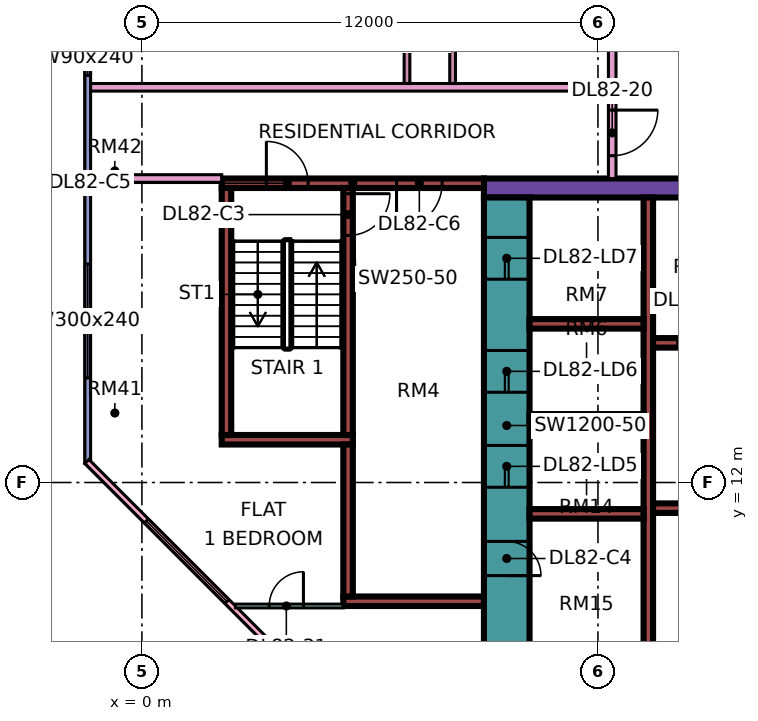
"""IFC4 building model, lengths in metres.
Left out: names, types, materials, properties, quantities, classifications, styles, units other than length and angle.
Written with IfcOpenShell. Run it as: python <this file> out.ifc"""

import sys

from ifc_helpers import new_model, si_unit, direction, frame, frame_2d, origin, place, context, subcontext, project, spatial, rectangle, extrude, element, fill, save


model = new_model("IFC4")
c1 = context("Model", 3, precision=1e-05, world=origin(), true_north=direction((0.0, 1.0)))
c2 = subcontext(c1, "Body", "Model", "MODEL_VIEW")
j1 = project(units=[si_unit("LENGTHUNIT", "METRE"), si_unit("PLANEANGLEUNIT", "RADIAN")], contexts=[c1])
p1 = place(None, origin())
s1 = spatial("IfcSite", under=j1, at=p1, CompositionType="ELEMENT")
p2 = place(p1, origin())
s2 = spatial("IfcBuilding", under=s1, at=p2, CompositionType="ELEMENT")
p3 = place(p2, frame((0.0, 0.0, 353.9)))
s3 = spatial("IfcBuildingStorey", under=s2, at=p3, CompositionType="ELEMENT", Elevation=353.9)
p4 = place(p3, frame((9.0, 19.75, 0.0), z_axis=(0.0, 0.0, 1.0), x_axis=(1.0, 0.0, 0.0)))
e1 = element("IfcWall", 1, at=p4, inside=s3, PredefinedType="SHEAR", context=c2, shape_type="SweptSolid", body=[
    extrude(rectangle(XDim=25.0, YDim=0.5, at=frame_2d((12.5, 0.0))), origin(), (0.0, 0.0, 1.0), 3.75),
])
p5 = place(p4, frame((19.1, 0.0, 0.0)))
e2 = element("IfcOpeningElement", 2, at=p5, cuts=e1, PredefinedType="OPENING", context=c2, shape_type="SweptSolid", body=[
    extrude(rectangle(XDim=1.8, YDim=2.4, at=frame_2d((0.9, 1.2))), frame((0.0, 0.26, 0.0), z_axis=(0.0, -1.0, 0.0), x_axis=(1.0, 0.0, 0.0)), (0.0, 0.0, 1.0), 0.52),
])
p6 = place(p3, frame((9.6, 7.5, 0.0), z_axis=(0.0, 0.0, 1.0), x_axis=(0.0, 1.0, 0.0)))
e3 = element("IfcWall", 3, at=p6, inside=s3, PredefinedType="SHEAR", context=c2, shape_type="SweptSolid", body=[
    extrude(rectangle(XDim=12.0, YDim=1.2, at=frame_2d((6.0, 0.0))), origin(), (0.0, 0.0, 1.0), 3.75),
])
p7 = place(p6, frame((4.375, 0.0, 0.0)))
e4 = element("IfcOpeningElement", 4, at=p7, cuts=e3, PredefinedType="OPENING", context=c2, shape_type="SweptSolid", body=[
    extrude(rectangle(XDim=1.1, YDim=2.2, at=frame_2d((0.55, 1.1))), frame((0.0, 0.61, 0.0), z_axis=(0.0, -1.0, 0.0), x_axis=(1.0, 0.0, 0.0)), (0.0, 0.0, 1.0), 1.22),
])
p8 = place(p6, frame((6.875, 0.0, 0.0)))
e5 = element("IfcOpeningElement", 5, at=p8, cuts=e3, PredefinedType="OPENING", context=c2, shape_type="SweptSolid", body=[
    extrude(rectangle(XDim=1.1, YDim=2.2, at=frame_2d((0.55, 1.1))), frame((0.0, 0.61, 0.0), z_axis=(0.0, -1.0, 0.0), x_axis=(1.0, 0.0, 0.0)), (0.0, 0.0, 1.0), 1.22),
])
p9 = place(p6, frame((9.85, 0.0, 0.0)))
e6 = element("IfcOpeningElement", 6, at=p9, cuts=e3, PredefinedType="OPENING", context=c2, shape_type="SweptSolid", body=[
    extrude(rectangle(XDim=1.1, YDim=2.2, at=frame_2d((0.55, 1.1))), frame((0.0, 0.61, 0.0), z_axis=(0.0, -1.0, 0.0), x_axis=(1.0, 0.0, 0.0)), (0.0, 0.0, 1.0), 1.22),
])
p10 = place(p6, frame((2.05, 0.0, 0.0)))
e7 = element("IfcOpeningElement", 7, at=p10, cuts=e3, PredefinedType="OPENING", context=c2, shape_type="SweptSolid", body=[
    extrude(rectangle(XDim=0.9, YDim=2.1, at=frame_2d((0.45, 1.05))), frame((0.0, 0.61, 0.0), z_axis=(0.0, -1.0, 0.0), x_axis=(1.0, 0.0, 0.0)), (0.0, 0.0, 1.0), 1.22),
])
p11 = place(p3, frame((13.325, 7.5, 0.0), z_axis=(0.0, 0.0, 1.0), x_axis=(0.0, 1.0, 0.0)))
e8 = element("IfcWall", 8, at=p11, inside=s3, PredefinedType="SHEAR", context=c2, shape_type="SweptSolid", body=[
    extrude(rectangle(XDim=12.0, YDim=0.25, at=frame_2d((6.0, 0.0))), origin(), (0.0, 0.0, 1.0), 3.75),
])
p12 = place(p3, frame((13.45, 11.325, 0.0), z_axis=(0.0, 0.0, 1.0), x_axis=(1.0, 0.0, 0.0)))
e9 = element("IfcWall", 9, at=p12, inside=s3, PredefinedType="SHEAR", context=c2, shape_type="SweptSolid", body=[
    extrude(rectangle(XDim=20.05, YDim=0.25, at=frame_2d((10.025, 0.0))), origin(), (0.0, 0.0, 1.0), 3.75),
])
p13 = place(p12, frame((1.55, 0.0, 0.0)))
e10 = element("IfcOpeningElement", 10, at=p13, cuts=e9, PredefinedType="OPENING", context=c2, shape_type="SweptSolid", body=[
    extrude(rectangle(XDim=0.9, YDim=2.1, at=frame_2d((0.45, 1.05))), frame((0.0, 0.135, 0.0), z_axis=(0.0, -1.0, 0.0), x_axis=(1.0, 0.0, 0.0)), (0.0, 0.0, 1.0), 0.27),
])
p14 = place(p12, frame((6.925, 0.0, 0.0)))
e11 = element("IfcOpeningElement", 11, at=p14, cuts=e9, PredefinedType="OPENING", context=c2, shape_type="SweptSolid", body=[
    extrude(rectangle(XDim=0.9, YDim=2.1, at=frame_2d((0.45, 1.05))), frame((0.0, 0.135, 0.0), z_axis=(0.0, -1.0, 0.0), x_axis=(1.0, 0.0, 0.0)), (0.0, 0.0, 1.0), 0.27),
])
p15 = place(p12, frame((15.075, 0.0, 0.0)))
e12 = element("IfcOpeningElement", 12, at=p15, cuts=e9, PredefinedType="OPENING", context=c2, shape_type="SweptSolid", body=[
    extrude(rectangle(XDim=0.9, YDim=2.1, at=frame_2d((0.45, 1.05))), frame((0.0, 0.135, 0.0), z_axis=(0.0, -1.0, 0.0), x_axis=(1.0, 0.0, 0.0)), (0.0, 0.0, 1.0), 0.27),
])
p16 = place(p3, frame((13.45, 15.675, 0.0), z_axis=(0.0, 0.0, 1.0), x_axis=(1.0, 0.0, 0.0)))
e13 = element("IfcWall", 13, at=p16, inside=s3, PredefinedType="SHEAR", context=c2, shape_type="SweptSolid", body=[
    extrude(rectangle(XDim=13.75, YDim=0.25, at=frame_2d((6.875, 0.0))), origin(), (0.0, 0.0, 1.0), 3.75),
])
p17 = place(p16, frame((0.65, 0.0, 0.0)))
e14 = element("IfcOpeningElement", 14, at=p17, cuts=e13, PredefinedType="OPENING", context=c2, shape_type="SweptSolid", body=[
    extrude(rectangle(XDim=1.2, YDim=2.2, at=frame_2d((0.6, 1.1))), frame((0.0, 0.135, 0.0), z_axis=(0.0, -1.0, 0.0), x_axis=(1.0, 0.0, 0.0)), (0.0, 0.0, 1.0), 0.27),
])
p18 = place(p16, frame((3.4, 0.0, 0.0)))
e15 = element("IfcOpeningElement", 15, at=p18, cuts=e13, PredefinedType="OPENING", context=c2, shape_type="SweptSolid", body=[
    extrude(rectangle(XDim=1.2, YDim=2.2, at=frame_2d((0.6, 1.1))), frame((0.0, 0.135, 0.0), z_axis=(0.0, -1.0, 0.0), x_axis=(1.0, 0.0, 0.0)), (0.0, 0.0, 1.0), 0.27),
])
p19 = place(p16, frame((6.15, 0.0, 0.0)))
e16 = element("IfcOpeningElement", 16, at=p19, cuts=e13, PredefinedType="OPENING", context=c2, shape_type="SweptSolid", body=[
    extrude(rectangle(XDim=1.2, YDim=2.2, at=frame_2d((0.6, 1.1))), frame((0.0, 0.135, 0.0), z_axis=(0.0, -1.0, 0.0), x_axis=(1.0, 0.0, 0.0)), (0.0, 0.0, 1.0), 0.27),
])
p20 = place(p16, frame((8.9, 0.0, 0.0)))
e17 = element("IfcOpeningElement", 17, at=p20, cuts=e13, PredefinedType="OPENING", context=c2, shape_type="SweptSolid", body=[
    extrude(rectangle(XDim=1.2, YDim=2.2, at=frame_2d((0.6, 1.1))), frame((0.0, 0.135, 0.0), z_axis=(0.0, -1.0, 0.0), x_axis=(1.0, 0.0, 0.0)), (0.0, 0.0, 1.0), 0.27),
])
p21 = place(p16, frame((11.8, 0.0, 0.0)))
e18 = element("IfcOpeningElement", 18, at=p21, cuts=e13, PredefinedType="OPENING", context=c2, shape_type="SweptSolid", body=[
    extrude(rectangle(XDim=0.9, YDim=2.1, at=frame_2d((0.45, 1.05))), frame((0.0, 0.135, 0.0), z_axis=(0.0, -1.0, 0.0), x_axis=(1.0, 0.0, 0.0)), (0.0, 0.0, 1.0), 0.27),
])
for number, where, z_axis, x_axis in (
    (19, (10.2, 11.175, 0.0), (0.0, 0.0, 1.0), (1.0, 0.0, 0.0)),
    (20, (10.2, 13.675, 0.0), (0.0, 0.0, 1.0), (1.0, 0.0, 0.0)),
    (21, (10.2, 16.175, 0.0), (0.0, 0.0, 1.0), (1.0, 0.0, 0.0)),
):
    element("IfcWall", number, at=place(p3, frame(where, z_axis=z_axis, x_axis=x_axis)), inside=s3, PredefinedType="SHEAR", context=c2, shape_type="SweptSolid", body=[
        extrude(rectangle(XDim=3.0, YDim=0.25, at=frame_2d((1.5, 0.0))), origin(), (0.0, 0.0, 1.0), 3.75),
    ])
p22 = place(p3, frame((2.1, 19.875, 0.0), z_axis=(0.0, 0.0, 1.0), x_axis=(1.0, 0.0, 0.0)))
e22 = element("IfcWall", 22, at=p22, inside=s3, PredefinedType="SHEAR", context=c2, shape_type="SweptSolid", body=[
    extrude(rectangle(XDim=6.9, YDim=0.25, at=frame_2d((3.45, 0.0))), origin(), (0.0, 0.0, 1.0), 3.75),
])
p23 = place(p22, frame((1.175, 0.0, 0.0)))
e23 = element("IfcOpeningElement", 23, at=p23, cuts=e22, PredefinedType="OPENING", context=c2, shape_type="SweptSolid", body=[
    extrude(rectangle(XDim=1.1, YDim=2.2, at=frame_2d((0.55, 1.1))), frame((0.0, 0.135, 0.0), z_axis=(0.0, -1.0, 0.0), x_axis=(1.0, 0.0, 0.0)), (0.0, 0.0, 1.0), 0.27),
])
p24 = place(p22, frame((4.6, 0.0, 0.0)))
e24 = element("IfcOpeningElement", 24, at=p24, cuts=e22, PredefinedType="OPENING", context=c2, shape_type="SweptSolid", body=[
    extrude(rectangle(XDim=1.2, YDim=2.2, at=frame_2d((0.6, 1.1))), frame((0.0, 0.135, 0.0), z_axis=(0.0, -1.0, 0.0), x_axis=(1.0, 0.0, 0.0)), (0.0, 0.0, 1.0), 0.27),
])
p25 = place(p3, frame((2.1, 13.125, 0.0), z_axis=(0.0, 0.0, 1.0), x_axis=(1.0, 0.0, 0.0)))
e25 = element("IfcWall", 25, at=p25, inside=s3, PredefinedType="SHEAR", context=c2, shape_type="SweptSolid", body=[
    extrude(rectangle(XDim=3.45, YDim=0.25, at=frame_2d((1.725, 0.0))), origin(), (0.0, 0.0, 1.0), 3.75),
])
p26 = place(p3, frame((2.225, 13.25, 0.0), z_axis=(0.0, 0.0, 1.0), x_axis=(0.0, 1.0, 0.0)))
e26 = element("IfcWall", 26, at=p26, inside=s3, PredefinedType="SHEAR", context=c2, shape_type="SweptSolid", body=[
    extrude(rectangle(XDim=6.5, YDim=0.25, at=frame_2d((3.25, 0.0))), origin(), (0.0, 0.0, 1.0), 3.75),
])
p27 = place(p3, frame((5.425, 13.25, 0.0), z_axis=(0.0, 0.0, 1.0), x_axis=(0.0, 1.0, 0.0)))
e27 = element("IfcWall", 27, at=p27, inside=s3, PredefinedType="SHEAR", context=c2, shape_type="SweptSolid", body=[
    extrude(rectangle(XDim=6.5, YDim=0.25, at=frame_2d((3.25, 0.0))), origin(), (0.0, 0.0, 1.0), 3.75),
])
p28 = place(p27, frame((5.25, 0.0, 0.0)))
e28 = element("IfcOpeningElement", 28, at=p28, cuts=e27, PredefinedType="OPENING", context=c2, shape_type="SweptSolid", body=[
    extrude(rectangle(XDim=1.1, YDim=2.2, at=frame_2d((0.55, 1.1))), frame((0.0, 0.135, 0.0), z_axis=(0.0, -1.0, 0.0), x_axis=(1.0, 0.0, 0.0)), (0.0, 0.0, 1.0), 0.27),
])
p29 = place(p3, frame((5.3, 8.875, 0.0), z_axis=(0.0, 0.0, 1.0), x_axis=(1.0, 0.0, 0.0)))
e29 = element("IfcWall", 29, at=p29, inside=s3, PredefinedType="SHEAR", context=c2, shape_type="SweptSolid", body=[
    extrude(rectangle(XDim=3.7, YDim=0.25, at=frame_2d((1.85, 0.0))), origin(), (0.0, 0.0, 1.0), 3.75),
])
p30 = place(p3, frame((5.425, 9.0, 0.0), z_axis=(0.0, 0.0, 1.0), x_axis=(0.0, 1.0, 0.0)))
e30 = element("IfcWall", 30, at=p30, inside=s3, PredefinedType="SHEAR", context=c2, shape_type="SweptSolid", body=[
    extrude(rectangle(XDim=4.0, YDim=0.25, at=frame_2d((2.0, 0.0))), origin(), (0.0, 0.0, 1.0), 3.75),
])
p31 = place(p3, frame((-1.425, 23.925, 0.0), z_axis=(0.0, 0.0, 1.0), x_axis=(0.0, -1.0, 0.0)))
e31 = element("IfcWall", 31, at=p31, inside=s3, PredefinedType="SOLIDWALL", context=c2, shape_type="SweptSolid", body=[
    extrude(rectangle(XDim=11.425, YDim=0.15, at=frame_2d((5.712, 0.0))), origin(), (0.0, 0.0, 1.0), 3.35),
])
p32 = place(p31, frame((0.312, 0.0, 0.45)))
e32 = element("IfcOpeningElement", 32, at=p32, cuts=e31, PredefinedType="OPENING", context=c2, shape_type="SweptSolid", body=[
    extrude(rectangle(XDim=0.9, YDim=2.4, at=frame_2d((0.45, 1.2))), frame((0.0, 0.085, 0.0), z_axis=(0.0, -1.0, 0.0), x_axis=(1.0, 0.0, 0.0)), (0.0, 0.0, 1.0), 0.17),
])
p33 = place(p31, frame((6.175, 0.0, 0.45)))
e33 = element("IfcOpeningElement", 33, at=p33, cuts=e31, PredefinedType="OPENING", context=c2, shape_type="SweptSolid", body=[
    extrude(rectangle(XDim=3.0, YDim=2.4, at=frame_2d((1.5, 1.2))), frame((0.0, 0.085, 0.0), z_axis=(0.0, -1.0, 0.0), x_axis=(1.0, 0.0, 0.0)), (0.0, 0.0, 1.0), 0.17),
])
p34 = place(p3, frame((-1.447, 12.553, 0.0), z_axis=(0.0, 0.0, 1.0), x_axis=(0.707106781187, -0.707106781187, 0.0)))
e34 = element("IfcWall", 34, at=p34, inside=s3, PredefinedType="SOLIDWALL", context=c2, shape_type="SweptSolid", body=[
    extrude(rectangle(XDim=19.799, YDim=0.15, at=frame_2d((9.899, 0.0))), origin(), (0.0, 0.0, 1.0), 3.35),
])
p35 = place(p34, frame((2.212, 0.0, 0.45)))
e35 = element("IfcOpeningElement", 35, at=p35, cuts=e34, PredefinedType="OPENING", context=c2, shape_type="SweptSolid", body=[
    extrude(rectangle(XDim=3.0, YDim=2.4, at=frame_2d((1.5, 1.2))), frame((0.0, 0.085, 0.0), z_axis=(0.0, -1.0, 0.0), x_axis=(1.0, 0.0, 0.0)), (0.0, 0.0, 1.0), 0.17),
])
p36 = place(p34, frame((10.216, 0.0, 0.45)))
e36 = element("IfcOpeningElement", 36, at=p36, cuts=e34, PredefinedType="OPENING", context=c2, shape_type="SweptSolid", body=[
    extrude(rectangle(XDim=3.0, YDim=2.4, at=frame_2d((1.5, 1.2))), frame((0.0, 0.085, 0.0), z_axis=(0.0, -1.0, 0.0), x_axis=(1.0, 0.0, 0.0)), (0.0, 0.0, 1.0), 0.17),
])
p37 = place(p3, frame((-1.35, 20.0, 0.0), z_axis=(0.0, 0.0, 1.0), x_axis=(1.0, 0.0, 0.0)))
e37 = element("IfcWall", 37, at=p37, inside=s3, PredefinedType="PARTITIONING", context=c2, shape_type="SweptSolid", body=[
    extrude(rectangle(XDim=3.45, YDim=0.2, at=frame_2d((1.725, 0.0))), origin(), (0.0, 0.0, 1.0), 3.35),
])
p38 = place(p3, frame((-1.35, 22.4, 0.0), z_axis=(0.0, 0.0, 1.0), x_axis=(1.0, 0.0, 0.0)))
e38 = element("IfcWall", 38, at=p38, inside=s3, PredefinedType="PARTITIONING", context=c2, shape_type="SweptSolid", body=[
    extrude(rectangle(XDim=13.625, YDim=0.2, at=frame_2d((6.812, 0.0))), origin(), (0.0, 0.0, 1.0), 3.35),
])
p39 = place(p3, frame((2.461, 8.75, 0.0), z_axis=(0.0, 0.0, 1.0), x_axis=(1.0, 0.0, 0.0)))
e39 = element("IfcWall", 39, at=p39, inside=s3, PredefinedType="PARTITIONING", context=c2, shape_type="SweptSolid", body=[
    extrude(rectangle(XDim=2.839, YDim=0.1, at=frame_2d((1.419, 0.0))), origin(), (0.0, 0.0, 1.0), 3.35),
])
p40 = place(p39, frame((0.889, 0.0, 0.0)))
e40 = element("IfcOpeningElement", 40, at=p40, cuts=e39, PredefinedType="OPENING", context=c2, shape_type="SweptSolid", body=[
    extrude(rectangle(XDim=0.9, YDim=2.1, at=frame_2d((0.45, 1.05))), frame((0.0, 0.06, 0.0), z_axis=(0.0, -1.0, 0.0), x_axis=(1.0, 0.0, 0.0)), (0.0, 0.0, 1.0), 0.12),
])
p41 = place(p3, frame((6.975, 22.5, 0.0), z_axis=(0.0, 0.0, 1.0), x_axis=(0.0, 1.0, 0.0)))
e41 = element("IfcWall", 41, at=p41, inside=s3, PredefinedType="PARTITIONING", context=c2, shape_type="SweptSolid", body=[
    extrude(rectangle(XDim=10.55, YDim=0.15, at=frame_2d((5.275, 0.0))), origin(), (0.0, 0.0, 1.0), 3.35),
])
p42 = place(p41, frame((1.8, 0.0, 0.0)))
e42 = element("IfcOpeningElement", 42, at=p42, cuts=e41, PredefinedType="OPENING", context=c2, shape_type="SweptSolid", body=[
    extrude(rectangle(XDim=0.9, YDim=2.1, at=frame_2d((0.45, 1.05))), frame((0.0, 0.085, 0.0), z_axis=(0.0, -1.0, 0.0), x_axis=(1.0, 0.0, 0.0)), (0.0, 0.0, 1.0), 0.17),
])
p43 = place(p41, frame((8.55, 0.0, 0.0)))
e43 = element("IfcOpeningElement", 43, at=p43, cuts=e41, PredefinedType="OPENING", context=c2, shape_type="SweptSolid", body=[
    extrude(rectangle(XDim=0.9, YDim=2.1, at=frame_2d((0.45, 1.05))), frame((0.0, 0.085, 0.0), z_axis=(0.0, -1.0, 0.0), x_axis=(1.0, 0.0, 0.0)), (0.0, 0.0, 1.0), 0.17),
])
p44 = place(p3, frame((8.175, 22.5, 0.0), z_axis=(0.0, 0.0, 1.0), x_axis=(0.0, 1.0, 0.0)))
e44 = element("IfcWall", 44, at=p44, inside=s3, PredefinedType="PARTITIONING", context=c2, shape_type="SweptSolid", body=[
    extrude(rectangle(XDim=9.975, YDim=0.15, at=frame_2d((4.988, 0.0))), origin(), (0.0, 0.0, 1.0), 3.35),
])
p45 = place(p44, frame((8.25, 0.0, 0.0)))
e45 = element("IfcOpeningElement", 45, at=p45, cuts=e44, PredefinedType="OPENING", context=c2, shape_type="SweptSolid", body=[
    extrude(rectangle(XDim=0.8, YDim=2.1, at=frame_2d((0.4, 1.05))), frame((0.0, 0.085, 0.0), z_axis=(0.0, -1.0, 0.0), x_axis=(1.0, 0.0, 0.0)), (0.0, 0.0, 1.0), 0.17),
])
p46 = place(p44, frame((3.2, 0.0, 0.0)))
e46 = element("IfcOpeningElement", 46, at=p46, cuts=e44, PredefinedType="OPENING", context=c2, shape_type="SweptSolid", body=[
    extrude(rectangle(XDim=0.9, YDim=2.1, at=frame_2d((0.45, 1.05))), frame((0.0, 0.085, 0.0), z_axis=(0.0, -1.0, 0.0), x_axis=(1.0, 0.0, 0.0)), (0.0, 0.0, 1.0), 0.17),
])
p47 = place(p3, frame((12.375, 20.0, 0.0), z_axis=(0.0, 0.0, 1.0), x_axis=(0.0, 1.0, 0.0)))
e47 = element("IfcWall", 47, at=p47, inside=s3, PredefinedType="PARTITIONING", context=c2, shape_type="SweptSolid", body=[
    extrude(rectangle(XDim=34.0, YDim=0.2, at=frame_2d((17.0, 0.0))), origin(), (0.0, 0.0, 1.0), 3.35),
])
p48 = place(p47, frame((22.95, 0.0, 0.0)))
e48 = element("IfcOpeningElement", 48, at=p48, cuts=e47, PredefinedType="OPENING", context=c2, shape_type="SweptSolid", body=[
    extrude(rectangle(XDim=1.0, YDim=2.1, at=frame_2d((0.5, 1.05))), frame((0.0, 0.11, 0.0), z_axis=(0.0, -1.0, 0.0), x_axis=(1.0, 0.0, 0.0)), (0.0, 0.0, 1.0), 0.22),
])
p49 = place(p47, frame((0.6, 0.0, 0.0)))
e49 = element("IfcOpeningElement", 49, at=p49, cuts=e47, PredefinedType="OPENING", context=c2, shape_type="SweptSolid", body=[
    extrude(rectangle(XDim=1.2, YDim=2.1, at=frame_2d((0.6, 1.05))), frame((0.0, 0.11, 0.0), z_axis=(0.0, -1.0, 0.0), x_axis=(1.0, 0.0, 0.0)), (0.0, 0.0, 1.0), 0.22),
])
p50 = place(p47, frame((13.65, 0.0, 0.0)))
e50 = element("IfcOpeningElement", 50, at=p50, cuts=e47, PredefinedType="OPENING", context=c2, shape_type="SweptSolid", body=[
    extrude(rectangle(XDim=1.0, YDim=2.1, at=frame_2d((0.5, 1.05))), frame((0.0, 0.11, 0.0), z_axis=(0.0, -1.0, 0.0), x_axis=(1.0, 0.0, 0.0)), (0.0, 0.0, 1.0), 0.22),
])
p51 = place(p32, origin())
e51 = element("IfcWindow", 51, at=p51, inside=s3, PartitioningType="SINGLE_PANEL", PredefinedType="WINDOW", context=c2, shape_type="SweptSolid", body=[
    extrude(rectangle(XDim=0.9, YDim=2.4, at=frame_2d((0.45, 1.2))), frame((0.0, 0.03, 0.0), z_axis=(0.0, -1.0, 0.0), x_axis=(1.0, 0.0, 0.0)), (0.0, 0.0, 1.0), 0.06),
])
fill(e32, e51)
p52 = place(p33, origin())
e52 = element("IfcWindow", 52, at=p52, inside=s3, PartitioningType="SINGLE_PANEL", PredefinedType="WINDOW", context=c2, shape_type="SweptSolid", body=[
    extrude(rectangle(XDim=3.0, YDim=2.4, at=frame_2d((1.5, 1.2))), frame((0.0, 0.03, 0.0), z_axis=(0.0, -1.0, 0.0), x_axis=(1.0, 0.0, 0.0)), (0.0, 0.0, 1.0), 0.06),
])
fill(e33, e52)
p53 = place(p35, origin())
e53 = element("IfcWindow", 53, at=p53, inside=s3, PartitioningType="SINGLE_PANEL", PredefinedType="WINDOW", context=c2, shape_type="SweptSolid", body=[
    extrude(rectangle(XDim=3.0, YDim=2.4, at=frame_2d((1.5, 1.2))), frame((0.0, 0.03, 0.0), z_axis=(0.0, -1.0, 0.0), x_axis=(1.0, 0.0, 0.0)), (0.0, 0.0, 1.0), 0.06),
])
fill(e35, e53)
p54 = place(p17, origin())
e54 = element("IfcDoor", 54, at=p54, inside=s3, OperationType="DOUBLE_DOOR_SLIDING", PredefinedType="DOOR", context=c2, shape_type="SweptSolid", body=[
    extrude(rectangle(XDim=1.2, YDim=2.2, at=frame_2d((0.6, 1.1))), frame((0.0, 0.025, 0.0), z_axis=(0.0, -1.0, 0.0), x_axis=(1.0, 0.0, 0.0)), (0.0, 0.0, 1.0), 0.05),
])
fill(e14, e54)
p55 = place(p7, origin())
e55 = element("IfcDoor", 55, at=p55, inside=s3, OperationType="DOUBLE_DOOR_SLIDING", PredefinedType="DOOR", context=c2, shape_type="SweptSolid", body=[
    extrude(rectangle(XDim=1.1, YDim=2.2, at=frame_2d((0.55, 1.1))), frame((0.0, 0.025, 0.0), z_axis=(0.0, -1.0, 0.0), x_axis=(1.0, 0.0, 0.0)), (0.0, 0.0, 1.0), 0.05),
])
fill(e4, e55)
p56 = place(p8, origin())
e56 = element("IfcDoor", 56, at=p56, inside=s3, OperationType="DOUBLE_DOOR_SLIDING", PredefinedType="DOOR", context=c2, shape_type="SweptSolid", body=[
    extrude(rectangle(XDim=1.1, YDim=2.2, at=frame_2d((0.55, 1.1))), frame((0.0, 0.025, 0.0), z_axis=(0.0, -1.0, 0.0), x_axis=(1.0, 0.0, 0.0)), (0.0, 0.0, 1.0), 0.05),
])
fill(e5, e56)
p57 = place(p9, origin())
e57 = element("IfcDoor", 57, at=p57, inside=s3, OperationType="DOUBLE_DOOR_SLIDING", PredefinedType="DOOR", context=c2, shape_type="SweptSolid", body=[
    extrude(rectangle(XDim=1.1, YDim=2.2, at=frame_2d((0.55, 1.1))), frame((0.0, 0.025, 0.0), z_axis=(0.0, -1.0, 0.0), x_axis=(1.0, 0.0, 0.0)), (0.0, 0.0, 1.0), 0.05),
])
fill(e6, e57)
p58 = place(p28, origin())
e58 = element("IfcDoor", 58, at=p58, inside=s3, OperationType="SINGLE_SWING_RIGHT", PredefinedType="DOOR", context=c2, shape_type="SweptSolid", body=[
    extrude(rectangle(XDim=1.1, YDim=2.2, at=frame_2d((0.55, 1.1))), frame((0.0, 0.025, 0.0), z_axis=(0.0, -1.0, 0.0), x_axis=(1.0, 0.0, 0.0)), (0.0, 0.0, 1.0), 0.05),
])
fill(e28, e58)
p59 = place(p10, frame((0.9, 0.0, 0.0), z_axis=(0.0, 0.0, 1.0), x_axis=(-1.0, 0.0, 0.0)))
e59 = element("IfcDoor", 59, at=p59, inside=s3, OperationType="SINGLE_SWING_LEFT", PredefinedType="DOOR", context=c2, shape_type="SweptSolid", body=[
    extrude(rectangle(XDim=0.9, YDim=2.1, at=frame_2d((0.45, 1.05))), frame((0.0, 0.025, 0.0), z_axis=(0.0, -1.0, 0.0), x_axis=(1.0, 0.0, 0.0)), (0.0, 0.0, 1.0), 0.05),
])
fill(e7, e59)
p60 = place(p23, origin())
e60 = element("IfcDoor", 60, at=p60, inside=s3, OperationType="SINGLE_SWING_LEFT", PredefinedType="DOOR", context=c2, shape_type="SweptSolid", body=[
    extrude(rectangle(XDim=1.1, YDim=2.2, at=frame_2d((0.55, 1.1))), frame((0.0, 0.025, 0.0), z_axis=(0.0, -1.0, 0.0), x_axis=(1.0, 0.0, 0.0)), (0.0, 0.0, 1.0), 0.05),
])
fill(e23, e60)
p61 = place(p24, frame((1.2, 0.0, 0.0), z_axis=(0.0, 0.0, 1.0), x_axis=(-1.0, 0.0, 0.0)))
e61 = element("IfcDoor", 61, at=p61, inside=s3, OperationType="SINGLE_SWING_LEFT", PredefinedType="DOOR", context=c2, shape_type="SweptSolid", body=[
    extrude(rectangle(XDim=1.2, YDim=2.2, at=frame_2d((0.6, 1.1))), frame((0.0, 0.025, 0.0), z_axis=(0.0, -1.0, 0.0), x_axis=(1.0, 0.0, 0.0)), (0.0, 0.0, 1.0), 0.05),
])
fill(e24, e61)
p62 = place(p49, origin())
e62 = element("IfcDoor", 62, at=p62, inside=s3, OperationType="SINGLE_SWING_RIGHT", PredefinedType="DOOR", context=c2, shape_type="SweptSolid", body=[
    extrude(rectangle(XDim=1.2, YDim=2.1, at=frame_2d((0.6, 1.05))), frame((0.0, 0.025, 0.0), z_axis=(0.0, -1.0, 0.0), x_axis=(1.0, 0.0, 0.0)), (0.0, 0.0, 1.0), 0.05),
])
fill(e49, e62)
p63 = place(p40, frame((0.9, 0.0, 0.0), z_axis=(0.0, 0.0, 1.0), x_axis=(-1.0, 0.0, 0.0)))
e63 = element("IfcDoor", 63, at=p63, inside=s3, OperationType="SINGLE_SWING_RIGHT", PredefinedType="DOOR", context=c2, shape_type="SweptSolid", body=[
    extrude(rectangle(XDim=0.9, YDim=2.1, at=frame_2d((0.45, 1.05))), frame((0.0, 0.025, 0.0), z_axis=(0.0, -1.0, 0.0), x_axis=(1.0, 0.0, 0.0)), (0.0, 0.0, 1.0), 0.05),
])
fill(e40, e63)
save(model, sys.argv[1])
